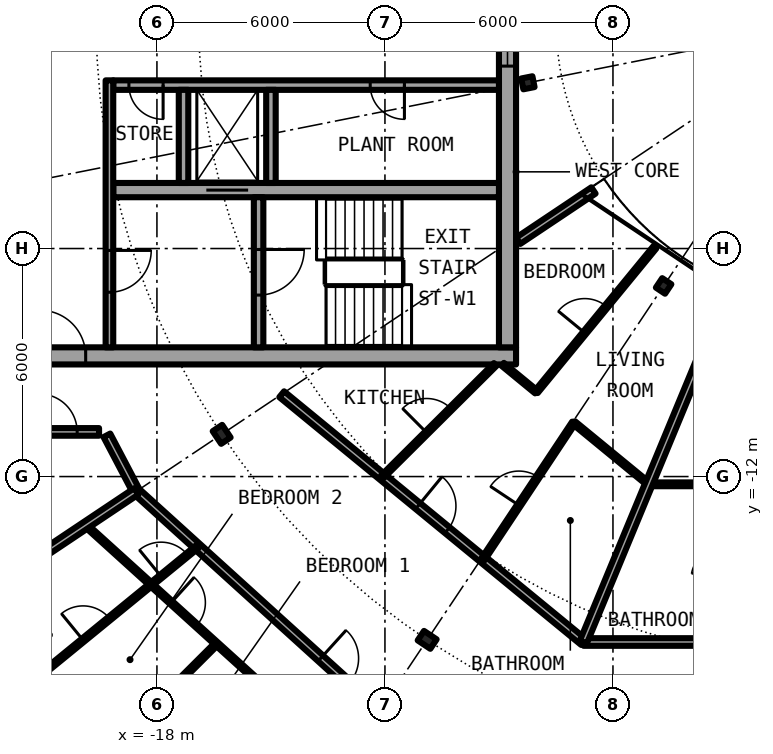
"""IFC4 building model, lengths in metres.
Left out: names, types, materials, properties, quantities, classifications, styles, units other than length and angle.
Written with IfcOpenShell. Run it as: python <this file> out.ifc"""

import sys

from ifc_helpers import new_model, si_unit, direction, frame, frame_2d, origin, origin_2d, place, context, subcontext, project, spatial, rectangle, i_section, extrude, element, fill, save


model = new_model("IFC4")
c1 = context("Model", 3, precision=1e-05, world=origin(), true_north=direction((0.0, 1.0)))
c2 = subcontext(c1, "Body", "Model", "MODEL_VIEW")
j1 = project(units=[si_unit("LENGTHUNIT", "METRE"), si_unit("PLANEANGLEUNIT", "RADIAN")], contexts=[c1])
p1 = place(None, origin())
s1 = spatial("IfcSite", under=j1, at=p1, CompositionType="ELEMENT")
p2 = place(p1, origin())
s2 = spatial("IfcBuilding", under=s1, at=p2, CompositionType="ELEMENT")
p3 = place(p2, frame((0.0, 0.0, 202.4)))
s3 = spatial("IfcBuildingStorey", under=s2, at=p3, CompositionType="ELEMENT", Elevation=202.4)
for number, where, z_axis, x_axis in (
    (1, (-16.297, -10.889, 0.0), (0.0, 0.0, 1.0), (-0.831, -0.556, 0.0)),
    (2, (-10.889, -16.297, 0.0), (0.0, 0.0, 1.0), (-0.556, -0.831, 0.0)),
):
    element("IfcColumn", number, at=place(p3, frame(where, z_axis=z_axis, x_axis=x_axis)), inside=s3, PredefinedType="COLUMN", context=c2, shape_type="SweptSolid", body=[
        extrude(i_section(OverallWidth=0.3, OverallDepth=0.4, WebThickness=0.013, FlangeThickness=0.024, FilletRadius=0.027, at=origin_2d()), origin(), (0.0, 0.0, 1.0), 3.05),
    ])
for number, where, z_axis, x_axis in (
    (3, (-8.239, -1.639, 0.0), (0.0, 0.0, 1.0), (-0.981, -0.195, 0.0)),
    (4, (-4.667, -6.984, 0.0), (0.0, 0.0, 1.0), (-0.556, -0.831, 0.0)),
):
    element("IfcColumn", number, at=place(p3, frame(where, z_axis=z_axis, x_axis=x_axis)), inside=s3, PredefinedType="COLUMN", context=c2, shape_type="SweptSolid", body=[
        extrude(i_section(OverallWidth=0.3, OverallDepth=0.29, WebThickness=0.009, FlangeThickness=0.014, FilletRadius=0.027, at=origin_2d()), origin(), (0.0, 0.0, 1.0), 3.05),
    ])
p4 = place(p3, frame((-22.699, -15.167, 0.0), z_axis=(0.0, 0.0, 1.0), x_axis=(0.634382322723, -0.773019449054, 0.0)))
e5 = element("IfcWall", 5, at=p4, inside=s3, PredefinedType="SOLIDWALL", context=c2, shape_type="SweptSolid", body=[
    extrude(rectangle(XDim=5.352, YDim=0.25, at=frame_2d((2.676, 0.0))), origin(), (0.0, 0.0, 1.0), 2.7),
])
p5 = place(p4, frame((0.441, 0.0, 0.3)))
e6 = element("IfcOpeningElement", 6, at=p5, cuts=e5, PredefinedType="OPENING", context=c2, shape_type="SweptSolid", body=[
    extrude(rectangle(XDim=1.8, YDim=2.1, at=frame_2d((0.9, 1.05))), frame((0.0, 0.135, 0.0), z_axis=(0.0, -1.0, 0.0), x_axis=(1.0, 0.0, 0.0)), (0.0, 0.0, 1.0), 0.27),
])
p6 = place(p4, frame((3.51, 0.0, 0.0)))
e7 = element("IfcOpeningElement", 7, at=p6, cuts=e5, PredefinedType="OPENING", context=c2, shape_type="SweptSolid", body=[
    extrude(rectangle(XDim=1.0, YDim=2.2, at=frame_2d((0.5, 1.1))), frame((0.0, 0.135, 0.0), z_axis=(0.0, -1.0, 0.0), x_axis=(1.0, 0.0, 0.0)), (0.0, 0.0, 1.0), 0.27),
])
p7 = place(p3, frame((-22.05, -8.825, 0.0), z_axis=(0.0, 0.0, 1.0), x_axis=(1.0, 0.0, 0.0)))
e8 = element("IfcWall", 8, at=p7, inside=s3, PredefinedType="SHEAR", context=c2, shape_type="SweptSolid", body=[
    extrude(rectangle(XDim=13.5, YDim=0.45, at=frame_2d((6.75, 0.0))), origin(), (0.0, 0.0, 1.0), 3.05),
])
p8 = place(p7, frame((0.975, 0.0, 0.0)))
e9 = element("IfcOpeningElement", 9, at=p8, cuts=e8, PredefinedType="OPENING", context=c2, shape_type="SweptSolid", body=[
    extrude(rectangle(XDim=1.2, YDim=2.3, at=frame_2d((0.6, 1.15))), frame((0.0, 0.235, 0.0), z_axis=(0.0, -1.0, 0.0), x_axis=(1.0, 0.0, 0.0)), (0.0, 0.0, 1.0), 0.47),
])
p9 = place(p3, frame((-8.775, 8.6, 0.0), z_axis=(0.0, 0.0, 1.0), x_axis=(0.0, -1.0, 0.0)))
e10 = element("IfcWall", 10, at=p9, inside=s3, PredefinedType="SHEAR", context=c2, shape_type="SweptSolid", body=[
    extrude(rectangle(XDim=17.2, YDim=0.45, at=frame_2d((8.6, 0.0))), origin(), (0.0, 0.0, 1.0), 3.05),
])
p10 = place(p9, frame((7.4, 0.0, 0.1)))
e11 = element("IfcOpeningElement", 11, at=p10, cuts=e10, PredefinedType="OPENING", context=c2, shape_type="SweptSolid", body=[
    extrude(rectangle(XDim=2.4, YDim=2.2, at=frame_2d((1.2, 1.1))), frame((0.0, 0.235, 0.0), z_axis=(0.0, -1.0, 0.0), x_axis=(1.0, 0.0, 0.0)), (0.0, 0.0, 1.0), 0.47),
])
p11 = place(p3, frame((-9.0, -1.7, 0.0), z_axis=(0.0, 0.0, 1.0), x_axis=(-1.0, 0.0, 0.0)))
e12 = element("IfcWall", 12, at=p11, inside=s3, PredefinedType="SHEAR", context=c2, shape_type="SweptSolid", body=[
    extrude(rectangle(XDim=10.15, YDim=0.25, at=frame_2d((5.075, 0.0))), origin(), (0.0, 0.0, 1.0), 3.05),
])
p12 = place(p11, frame((2.488, 0.0, 0.0)))
e13 = element("IfcOpeningElement", 13, at=p12, cuts=e12, PredefinedType="OPENING", context=c2, shape_type="SweptSolid", body=[
    extrude(rectangle(XDim=0.9, YDim=2.3, at=frame_2d((0.45, 1.15))), frame((0.0, 0.135, 0.0), z_axis=(0.0, -1.0, 0.0), x_axis=(1.0, 0.0, 0.0)), (0.0, 0.0, 1.0), 0.27),
])
p13 = place(p11, frame((8.837, 0.0, 0.0)))
e14 = element("IfcOpeningElement", 14, at=p13, cuts=e12, PredefinedType="OPENING", context=c2, shape_type="SweptSolid", body=[
    extrude(rectangle(XDim=0.9, YDim=2.3, at=frame_2d((0.45, 1.15))), frame((0.0, 0.135, 0.0), z_axis=(0.0, -1.0, 0.0), x_axis=(1.0, 0.0, 0.0)), (0.0, 0.0, 1.0), 0.27),
])
p14 = place(p3, frame((-9.0, -4.462, 0.0), z_axis=(0.0, 0.0, 1.0), x_axis=(-1.0, 0.0, 0.0)))
e15 = element("IfcWall", 15, at=p14, inside=s3, PredefinedType="SHEAR", context=c2, shape_type="SweptSolid", body=[
    extrude(rectangle(XDim=10.15, YDim=0.375, at=frame_2d((5.075, 0.0))), origin(), (0.0, 0.0, 1.0), 3.05),
])
p15 = place(p14, frame((6.6, 0.0, 0.0)))
e16 = element("IfcOpeningElement", 16, at=p15, cuts=e15, PredefinedType="OPENING", context=c2, shape_type="SweptSolid", body=[
    extrude(rectangle(XDim=1.1, YDim=2.3, at=frame_2d((0.55, 1.15))), frame((0.0, 0.198, 0.0), z_axis=(0.0, -1.0, 0.0), x_axis=(1.0, 0.0, 0.0)), (0.0, 0.0, 1.0), 0.395),
])
p16 = place(p3, frame((-15.325, -4.65, 0.0), z_axis=(0.0, 0.0, 1.0), x_axis=(0.0, -1.0, 0.0)))
e17 = element("IfcWall", 17, at=p16, inside=s3, PredefinedType="SHEAR", context=c2, shape_type="SweptSolid", body=[
    extrude(rectangle(XDim=3.95, YDim=0.25, at=frame_2d((1.975, 0.0))), origin(), (0.0, 0.0, 1.0), 3.05),
])
p17 = place(p16, frame((1.375, 0.0, 0.0)))
e18 = element("IfcOpeningElement", 18, at=p17, cuts=e17, PredefinedType="OPENING", context=c2, shape_type="SweptSolid", body=[
    extrude(rectangle(XDim=1.2, YDim=2.3, at=frame_2d((0.6, 1.15))), frame((0.0, 0.135, 0.0), z_axis=(0.0, -1.0, 0.0), x_axis=(1.0, 0.0, 0.0)), (0.0, 0.0, 1.0), 0.27),
])
for number, where, z_axis, x_axis in (
    (19, (-15.0, -1.825, 0.0), (0.0, 0.0, 1.0), (0.0, -1.0, 0.0)),
    (20, (-17.3, -1.825, 0.0), (0.0, 0.0, 1.0), (0.0, -1.0, 0.0)),
):
    element("IfcWall", number, at=place(p3, frame(where, z_axis=z_axis, x_axis=x_axis)), inside=s3, PredefinedType="SOLIDWALL", context=c2, shape_type="SweptSolid", body=[
        extrude(rectangle(XDim=2.45, YDim=0.25, at=frame_2d((1.225, 0.0))), origin(), (0.0, 0.0, 1.0), 2.7),
    ])
p18 = place(p3, frame((-19.25, -1.575, 0.0), z_axis=(0.0, 0.0, 1.0), x_axis=(0.0, -1.0, 0.0)))
e21 = element("IfcWall", 21, at=p18, inside=s3, PredefinedType="SOLIDWALL", context=c2, shape_type="SweptSolid", body=[
    extrude(rectangle(XDim=7.025, YDim=0.2, at=frame_2d((3.513, 0.0))), origin(), (0.0, 0.0, 1.0), 2.7),
])
p19 = place(p18, frame((4.475, 0.0, 0.0)))
e22 = element("IfcOpeningElement", 22, at=p19, cuts=e21, PredefinedType="OPENING", context=c2, shape_type="SweptSolid", body=[
    extrude(rectangle(XDim=1.1, YDim=2.3, at=frame_2d((0.55, 1.15))), frame((0.0, 0.11, 0.0), z_axis=(0.0, -1.0, 0.0), x_axis=(1.0, 0.0, 0.0)), (0.0, 0.0, 1.0), 0.22),
])
p20 = place(p3, frame((-19.869, -13.284, 0.0), z_axis=(0.0, 0.0, 1.0), x_axis=(0.741104058203, -0.67139018083, 0.0)))
e23 = element("IfcWall", 23, at=p20, inside=s3, PredefinedType="PARTITIONING", context=c2, shape_type="SweptSolid", body=[
    extrude(rectangle(XDim=6.969, YDim=0.1, at=frame_2d((3.484, 0.0))), origin(), (0.0, 0.0, 1.0), 2.7),
])
p21 = place(p20, frame((3.028, 0.0, 0.0)))
e24 = element("IfcOpeningElement", 24, at=p21, cuts=e23, PredefinedType="OPENING", context=c2, shape_type="SweptSolid", body=[
    extrude(rectangle(XDim=0.9, YDim=2.3, at=frame_2d((0.45, 1.15))), frame((0.0, 0.06, 0.0), z_axis=(0.0, -1.0, 0.0), x_axis=(1.0, 0.0, 0.0)), (0.0, 0.0, 1.0), 0.12),
])
p22 = place(p3, frame((-19.317, -10.915, 0.0), z_axis=(0.0, 0.0, 1.0), x_axis=(0.465359652486, -0.885121683068, 0.0)))
e25 = element("IfcWall", 25, at=p22, inside=s3, PredefinedType="PARTITIONING", context=c2, shape_type="SweptSolid", body=[
    extrude(rectangle(XDim=1.665, YDim=0.2, at=frame_2d((0.833, 0.0))), origin(), (0.0, 0.0, 1.0), 2.7),
])
p23 = place(p3, frame((-18.542, -12.389, 0.0), z_axis=(0.0, 0.0, 1.0), x_axis=(0.74093897184, -0.671572363941, 0.0)))
e26 = element("IfcWall", 26, at=p23, inside=s3, PredefinedType="PARTITIONING", context=c2, shape_type="SweptSolid", body=[
    extrude(rectangle(XDim=10.84, YDim=0.2, at=frame_2d((5.42, 0.0))), origin(), (0.0, 0.0, 1.0), 2.7),
])
p24 = place(p23, frame((6.544, 0.0, 0.0)))
e27 = element("IfcOpeningElement", 27, at=p24, cuts=e26, PredefinedType="OPENING", context=c2, shape_type="SweptSolid", body=[
    extrude(rectangle(XDim=1.0, YDim=2.3, at=frame_2d((0.5, 1.15))), frame((0.0, 0.11, 0.0), z_axis=(0.0, -1.0, 0.0), x_axis=(1.0, 0.0, 0.0)), (0.0, 0.0, 1.0), 0.22),
])
p25 = place(p3, frame((-14.717, -9.834, 0.0), z_axis=(0.0, 0.0, 1.0), x_axis=(0.773034536097, -0.634363938131, 0.0)))
e28 = element("IfcWall", 28, at=p25, inside=s3, PredefinedType="PARTITIONING", context=c2, shape_type="SweptSolid", body=[
    extrude(rectangle(XDim=10.277, YDim=0.2, at=frame_2d((5.138, 0.0))), origin(), (0.0, 0.0, 1.0), 2.7),
])
p26 = place(p25, frame((4.638, 0.0, 0.0)))
e29 = element("IfcOpeningElement", 29, at=p26, cuts=e28, PredefinedType="OPENING", context=c2, shape_type="SweptSolid", body=[
    extrude(rectangle(XDim=1.0, YDim=2.3, at=frame_2d((0.5, 1.15))), frame((0.0, 0.11, 0.0), z_axis=(0.0, -1.0, 0.0), x_axis=(1.0, 0.0, 0.0)), (0.0, 0.0, 1.0), 0.22),
])
p27 = place(p3, frame((-6.773, -16.353, 0.0), z_axis=(0.0, 0.0, 1.0), x_axis=(1.0, 0.0, 0.0)))
e30 = element("IfcWall", 30, at=p27, inside=s3, PredefinedType="PARTITIONING", context=c2, shape_type="SweptSolid", body=[
    extrude(rectangle(XDim=13.546, YDim=0.2, at=frame_2d((6.773, 0.0))), origin(), (0.0, 0.0, 1.0), 2.7),
])
p28 = place(p27, frame((4.579, 0.0, 0.0)))
e31 = element("IfcOpeningElement", 31, at=p28, cuts=e30, PredefinedType="OPENING", context=c2, shape_type="SweptSolid", body=[
    extrude(rectangle(XDim=1.0, YDim=2.3, at=frame_2d((0.5, 1.15))), frame((0.0, 0.11, 0.0), z_axis=(0.0, -1.0, 0.0), x_axis=(1.0, 0.0, 0.0)), (0.0, 0.0, 1.0), 0.22),
])
p29 = place(p3, frame((-8.901, -9.047, 0.0), z_axis=(0.0, 0.0, 1.0), x_axis=(0.772786083133, -0.634666581534, 0.0)))
e32 = element("IfcWall", 32, at=p29, inside=s3, PredefinedType="PARTITIONING", context=c2, shape_type="SweptSolid", body=[
    extrude(rectangle(XDim=1.144, YDim=0.1, at=frame_2d((0.572, 0.0))), origin(), (0.0, 0.0, 1.0), 2.7),
])
p30 = place(p3, frame((-7.031, -10.582, 0.0), z_axis=(0.0, 0.0, 1.0), x_axis=(0.772943675046, -0.634474645046, 0.0)))
e33 = element("IfcWall", 33, at=p30, inside=s3, PredefinedType="PARTITIONING", context=c2, shape_type="SweptSolid", body=[
    extrude(rectangle(XDim=2.557, YDim=0.1, at=frame_2d((1.278, 0.0))), origin(), (0.0, 0.0, 1.0), 2.7),
])
p31 = place(p3, frame((-5.055, -12.204, 0.0), z_axis=(0.0, 0.0, 1.0), x_axis=(1.0, 0.0, 0.0)))
e34 = element("IfcWall", 34, at=p31, inside=s3, PredefinedType="PARTITIONING", context=c2, shape_type="SweptSolid", body=[
    extrude(rectangle(XDim=2.528, YDim=0.1, at=frame_2d((1.264, 0.0))), origin(), (0.0, 0.0, 1.0), 2.7),
])
p32 = place(p3, frame((-21.675, -10.825, 0.0), z_axis=(0.0, 0.0, 1.0), x_axis=(1.0, 0.0, 0.0)))
e35 = element("IfcWall", 35, at=p32, inside=s3, PredefinedType="PARTITIONING", context=c2, shape_type="SweptSolid", body=[
    extrude(rectangle(XDim=2.152, YDim=0.2, at=frame_2d((1.076, 0.0))), origin(), (0.0, 0.0, 1.0), 2.7),
])
p33 = place(p32, frame((0.576, 0.0, 0.0)))
e36 = element("IfcOpeningElement", 36, at=p33, cuts=e35, PredefinedType="OPENING", context=c2, shape_type="SweptSolid", body=[
    extrude(rectangle(XDim=1.0, YDim=2.3, at=frame_2d((0.5, 1.15))), frame((0.0, 0.11, 0.0), z_axis=(0.0, -1.0, 0.0), x_axis=(1.0, 0.0, 0.0)), (0.0, 0.0, 1.0), 0.22),
])
p34 = place(p3, frame((-6.513, -4.472, 0.0), z_axis=(0.0, 0.0, 1.0), x_axis=(-0.831403409976, -0.555669299026, 0.0)))
e37 = element("IfcWall", 37, at=p34, inside=s3, PredefinedType="PARTITIONING", context=c2, shape_type="SweptSolid", body=[
    extrude(rectangle(XDim=2.383, YDim=0.2, at=frame_2d((1.191, 0.0))), origin(), (0.0, 0.0, 1.0), 2.7),
])
p35 = place(p3, frame((-22.595, -15.098, 0.0), z_axis=(0.0, 0.0, 1.0), x_axis=(0.831387096605, 0.55569370664, 0.0)))
e38 = element("IfcWall", 38, at=p35, inside=s3, PredefinedType="PARTITIONING", context=c2, shape_type="SweptSolid", body=[
    extrude(rectangle(XDim=4.875, YDim=0.2, at=frame_2d((2.438, 0.0))), origin(), (0.0, 0.0, 1.0), 2.7),
])
p36 = place(p3, frame((-21.04, -17.199, 0.0), z_axis=(0.0, 0.0, 1.0), x_axis=(0.774310172558, 0.632806255241, 0.0)))
e39 = element("IfcWall", 39, at=p36, inside=s3, PredefinedType="PARTITIONING", context=c2, shape_type="SweptSolid", body=[
    extrude(rectangle(XDim=5.3, YDim=0.1, at=frame_2d((2.65, 0.0))), origin(), (0.0, 0.0, 1.0), 2.7),
])
p37 = place(p36, frame((4.066, 0.0, 0.0)))
e40 = element("IfcOpeningElement", 40, at=p37, cuts=e39, PredefinedType="OPENING", context=c2, shape_type="SweptSolid", body=[
    extrude(rectangle(XDim=0.9, YDim=2.3, at=frame_2d((0.45, 1.15))), frame((0.0, 0.06, 0.0), z_axis=(0.0, -1.0, 0.0), x_axis=(1.0, 0.0, 0.0)), (0.0, 0.0, 1.0), 0.12),
])
p38 = place(p36, frame((1.416, 0.0, 0.0)))
e41 = element("IfcOpeningElement", 41, at=p38, cuts=e39, PredefinedType="OPENING", context=c2, shape_type="SweptSolid", body=[
    extrude(rectangle(XDim=0.9, YDim=2.3, at=frame_2d((0.45, 1.15))), frame((0.0, 0.06, 0.0), z_axis=(0.0, -1.0, 0.0), x_axis=(1.0, 0.0, 0.0)), (0.0, 0.0, 1.0), 0.12),
])
p39 = place(p3, frame((-19.234, -19.197, 0.0), z_axis=(0.0, 0.0, 1.0), x_axis=(0.707722727509, 0.706490297858, 0.0)))
e42 = element("IfcWall", 42, at=p39, inside=s3, PredefinedType="PARTITIONING", context=c2, shape_type="SweptSolid", body=[
    extrude(rectangle(XDim=3.962, YDim=0.1, at=frame_2d((1.981, 0.0))), origin(), (0.0, 0.0, 1.0), 2.7),
])
p40 = place(p3, frame((-12.069, -12.007, 0.0), z_axis=(0.0, 0.0, 1.0), x_axis=(0.708909651863, 0.705299302067, 0.0)))
e43 = element("IfcWall", 43, at=p40, inside=s3, PredefinedType="PARTITIONING", context=c2, shape_type="SweptSolid", body=[
    extrude(rectangle(XDim=4.193, YDim=0.1, at=frame_2d((2.096, 0.0))), origin(), (0.0, 0.0, 1.0), 2.7),
])
p41 = place(p40, frame((1.646, 0.0, 0.0)))
e44 = element("IfcOpeningElement", 44, at=p41, cuts=e43, PredefinedType="OPENING", context=c2, shape_type="SweptSolid", body=[
    extrude(rectangle(XDim=0.9, YDim=2.3, at=frame_2d((0.45, 1.15))), frame((0.0, 0.06, 0.0), z_axis=(0.0, -1.0, 0.0), x_axis=(1.0, 0.0, 0.0)), (0.0, 0.0, 1.0), 0.12),
])
p42 = place(p3, frame((-9.421, -14.18, 0.0), z_axis=(0.0, 0.0, 1.0), x_axis=(0.553303732327, 0.832979579457, 0.0)))
e45 = element("IfcWall", 45, at=p42, inside=s3, PredefinedType="PARTITIONING", context=c2, shape_type="SweptSolid", body=[
    extrude(rectangle(XDim=4.319, YDim=0.1, at=frame_2d((2.16, 0.0))), origin(), (0.0, 0.0, 1.0), 2.7),
])
p43 = place(p42, frame((1.71, 0.0, 0.0)))
e46 = element("IfcOpeningElement", 46, at=p43, cuts=e45, PredefinedType="OPENING", context=c2, shape_type="SweptSolid", body=[
    extrude(rectangle(XDim=0.9, YDim=2.3, at=frame_2d((0.45, 1.15))), frame((0.0, 0.06, 0.0), z_axis=(0.0, -1.0, 0.0), x_axis=(1.0, 0.0, 0.0)), (0.0, 0.0, 1.0), 0.12),
])
p44 = place(p3, frame((-8.019, -9.771, 0.0), z_axis=(0.0, 0.0, 1.0), x_axis=(0.634401778971, 0.773003481776, 0.0)))
e47 = element("IfcWall", 47, at=p44, inside=s3, PredefinedType="PARTITIONING", context=c2, shape_type="SweptSolid", body=[
    extrude(rectangle(XDim=4.92, YDim=0.1, at=frame_2d((2.46, 0.0))), origin(), (0.0, 0.0, 1.0), 2.7),
])
p45 = place(p44, frame((2.01, 0.0, 0.0)))
e48 = element("IfcOpeningElement", 48, at=p45, cuts=e47, PredefinedType="OPENING", context=c2, shape_type="SweptSolid", body=[
    extrude(rectangle(XDim=0.9, YDim=2.3, at=frame_2d((0.45, 1.15))), frame((0.0, 0.06, 0.0), z_axis=(0.0, -1.0, 0.0), x_axis=(1.0, 0.0, 0.0)), (0.0, 0.0, 1.0), 0.12),
])
p46 = place(p3, frame((-6.778, -16.351, 0.0), z_axis=(0.0, 0.0, 1.0), x_axis=(0.382938658032, 0.923773773272, 0.0)))
e49 = element("IfcWall", 49, at=p46, inside=s3, PredefinedType="PARTITIONING", context=c2, shape_type="SweptSolid", body=[
    extrude(rectangle(XDim=9.981, YDim=0.2, at=frame_2d((4.99, 0.0))), origin(), (0.0, 0.0, 1.0), 2.7),
])
p47 = place(p15, origin())
e50 = element("IfcDoor", 50, at=p47, inside=s3, OperationType="DOUBLE_DOOR_SLIDING", PredefinedType="DOOR", context=c2, shape_type="SweptSolid", body=[
    extrude(rectangle(XDim=1.1, YDim=2.3, at=frame_2d((0.55, 1.15))), frame((0.0, 0.025, 0.0), z_axis=(0.0, -1.0, 0.0), x_axis=(1.0, 0.0, 0.0)), (0.0, 0.0, 1.0), 0.05),
])
fill(e16, e50)
p48 = place(p12, origin())
e51 = element("IfcDoor", 51, at=p48, inside=s3, OperationType="SINGLE_SWING_RIGHT", PredefinedType="DOOR", context=c2, shape_type="SweptSolid", body=[
    extrude(rectangle(XDim=0.9, YDim=2.3, at=frame_2d((0.45, 1.15))), frame((0.0, 0.025, 0.0), z_axis=(0.0, -1.0, 0.0), x_axis=(1.0, 0.0, 0.0)), (0.0, 0.0, 1.0), 0.05),
])
fill(e13, e51)
p49 = place(p13, origin())
e52 = element("IfcDoor", 52, at=p49, inside=s3, OperationType="SINGLE_SWING_LEFT", PredefinedType="DOOR", context=c2, shape_type="SweptSolid", body=[
    extrude(rectangle(XDim=0.9, YDim=2.3, at=frame_2d((0.45, 1.15))), frame((0.0, 0.025, 0.0), z_axis=(0.0, -1.0, 0.0), x_axis=(1.0, 0.0, 0.0)), (0.0, 0.0, 1.0), 0.05),
])
fill(e14, e52)
p50 = place(p17, origin())
e53 = element("IfcDoor", 53, at=p50, inside=s3, OperationType="SINGLE_SWING_LEFT", PredefinedType="DOOR", context=c2, shape_type="SweptSolid", body=[
    extrude(rectangle(XDim=1.2, YDim=2.3, at=frame_2d((0.6, 1.15))), frame((0.0, 0.025, 0.0), z_axis=(0.0, -1.0, 0.0), x_axis=(1.0, 0.0, 0.0)), (0.0, 0.0, 1.0), 0.05),
])
fill(e18, e53)
p51 = place(p19, origin())
e54 = element("IfcDoor", 54, at=p51, inside=s3, OperationType="SINGLE_SWING_LEFT", PredefinedType="DOOR", context=c2, shape_type="SweptSolid", body=[
    extrude(rectangle(XDim=1.1, YDim=2.3, at=frame_2d((0.55, 1.15))), frame((0.0, 0.025, 0.0), z_axis=(0.0, -1.0, 0.0), x_axis=(1.0, 0.0, 0.0)), (0.0, 0.0, 1.0), 0.05),
])
fill(e22, e54)
p52 = place(p8, origin())
e55 = element("IfcDoor", 55, at=p52, inside=s3, OperationType="SINGLE_SWING_RIGHT", PredefinedType="DOOR", context=c2, shape_type="SweptSolid", body=[
    extrude(rectangle(XDim=1.2, YDim=2.3, at=frame_2d((0.6, 1.15))), frame((0.0, 0.025, 0.0), z_axis=(0.0, -1.0, 0.0), x_axis=(1.0, 0.0, 0.0)), (0.0, 0.0, 1.0), 0.05),
])
fill(e9, e55)
p53 = place(p10, origin())
e56 = element("IfcWindow", 56, at=p53, inside=s3, PartitioningType="SINGLE_PANEL", PredefinedType="WINDOW", context=c2, shape_type="SweptSolid", body=[
    extrude(rectangle(XDim=2.4, YDim=2.2, at=frame_2d((1.2, 1.1))), frame((0.0, 0.03, 0.0), z_axis=(0.0, -1.0, 0.0), x_axis=(1.0, 0.0, 0.0)), (0.0, 0.0, 1.0), 0.06),
])
fill(e11, e56)
p54 = place(p24, origin())
e57 = element("IfcDoor", 57, at=p54, inside=s3, OperationType="SINGLE_SWING_RIGHT", PredefinedType="DOOR", context=c2, shape_type="SweptSolid", body=[
    extrude(rectangle(XDim=1.0, YDim=2.3, at=frame_2d((0.5, 1.15))), frame((0.0, 0.025, 0.0), z_axis=(0.0, -1.0, 0.0), x_axis=(1.0, 0.0, 0.0)), (0.0, 0.0, 1.0), 0.05),
])
fill(e27, e57)
p55 = place(p37, origin())
e58 = element("IfcDoor", 58, at=p55, inside=s3, OperationType="SINGLE_SWING_RIGHT", PredefinedType="DOOR", context=c2, shape_type="SweptSolid", body=[
    extrude(rectangle(XDim=0.9, YDim=2.3, at=frame_2d((0.45, 1.15))), frame((0.0, 0.025, 0.0), z_axis=(0.0, -1.0, 0.0), x_axis=(1.0, 0.0, 0.0)), (0.0, 0.0, 1.0), 0.05),
])
fill(e40, e58)
p56 = place(p21, origin())
e59 = element("IfcDoor", 59, at=p56, inside=s3, OperationType="SINGLE_SWING_LEFT", PredefinedType="DOOR", context=c2, shape_type="SweptSolid", body=[
    extrude(rectangle(XDim=0.9, YDim=2.3, at=frame_2d((0.45, 1.15))), frame((0.0, 0.025, 0.0), z_axis=(0.0, -1.0, 0.0), x_axis=(1.0, 0.0, 0.0)), (0.0, 0.0, 1.0), 0.05),
])
fill(e24, e59)
p57 = place(p38, origin())
e60 = element("IfcDoor", 60, at=p57, inside=s3, OperationType="SINGLE_SWING_LEFT", PredefinedType="DOOR", context=c2, shape_type="SweptSolid", body=[
    extrude(rectangle(XDim=0.9, YDim=2.3, at=frame_2d((0.45, 1.15))), frame((0.0, 0.025, 0.0), z_axis=(0.0, -1.0, 0.0), x_axis=(1.0, 0.0, 0.0)), (0.0, 0.0, 1.0), 0.05),
])
fill(e41, e60)
p58 = place(p26, origin())
e61 = element("IfcDoor", 61, at=p58, inside=s3, OperationType="SINGLE_SWING_LEFT", PredefinedType="DOOR", context=c2, shape_type="SweptSolid", body=[
    extrude(rectangle(XDim=1.0, YDim=2.3, at=frame_2d((0.5, 1.15))), frame((0.0, 0.025, 0.0), z_axis=(0.0, -1.0, 0.0), x_axis=(1.0, 0.0, 0.0)), (0.0, 0.0, 1.0), 0.05),
])
fill(e29, e61)
p59 = place(p43, origin())
e62 = element("IfcDoor", 62, at=p59, inside=s3, OperationType="SINGLE_SWING_RIGHT", PredefinedType="DOOR", context=c2, shape_type="SweptSolid", body=[
    extrude(rectangle(XDim=0.9, YDim=2.3, at=frame_2d((0.45, 1.15))), frame((0.0, 0.025, 0.0), z_axis=(0.0, -1.0, 0.0), x_axis=(1.0, 0.0, 0.0)), (0.0, 0.0, 1.0), 0.05),
])
fill(e46, e62)
p60 = place(p41, origin())
e63 = element("IfcDoor", 63, at=p60, inside=s3, OperationType="SINGLE_SWING_LEFT", PredefinedType="DOOR", context=c2, shape_type="SweptSolid", body=[
    extrude(rectangle(XDim=0.9, YDim=2.3, at=frame_2d((0.45, 1.15))), frame((0.0, 0.025, 0.0), z_axis=(0.0, -1.0, 0.0), x_axis=(1.0, 0.0, 0.0)), (0.0, 0.0, 1.0), 0.05),
])
fill(e44, e63)
p61 = place(p45, origin())
e64 = element("IfcDoor", 64, at=p61, inside=s3, OperationType="SINGLE_SWING_LEFT", PredefinedType="DOOR", context=c2, shape_type="SweptSolid", body=[
    extrude(rectangle(XDim=0.9, YDim=2.3, at=frame_2d((0.45, 1.15))), frame((0.0, 0.025, 0.0), z_axis=(0.0, -1.0, 0.0), x_axis=(1.0, 0.0, 0.0)), (0.0, 0.0, 1.0), 0.05),
])
fill(e48, e64)
p62 = place(p33, origin())
e65 = element("IfcDoor", 65, at=p62, inside=s3, OperationType="SINGLE_SWING_LEFT", PredefinedType="DOOR", context=c2, shape_type="SweptSolid", body=[
    extrude(rectangle(XDim=1.0, YDim=2.3, at=frame_2d((0.5, 1.15))), frame((0.0, 0.025, 0.0), z_axis=(0.0, -1.0, 0.0), x_axis=(1.0, 0.0, 0.0)), (0.0, 0.0, 1.0), 0.05),
])
fill(e36, e65)
save(model, sys.argv[1])
